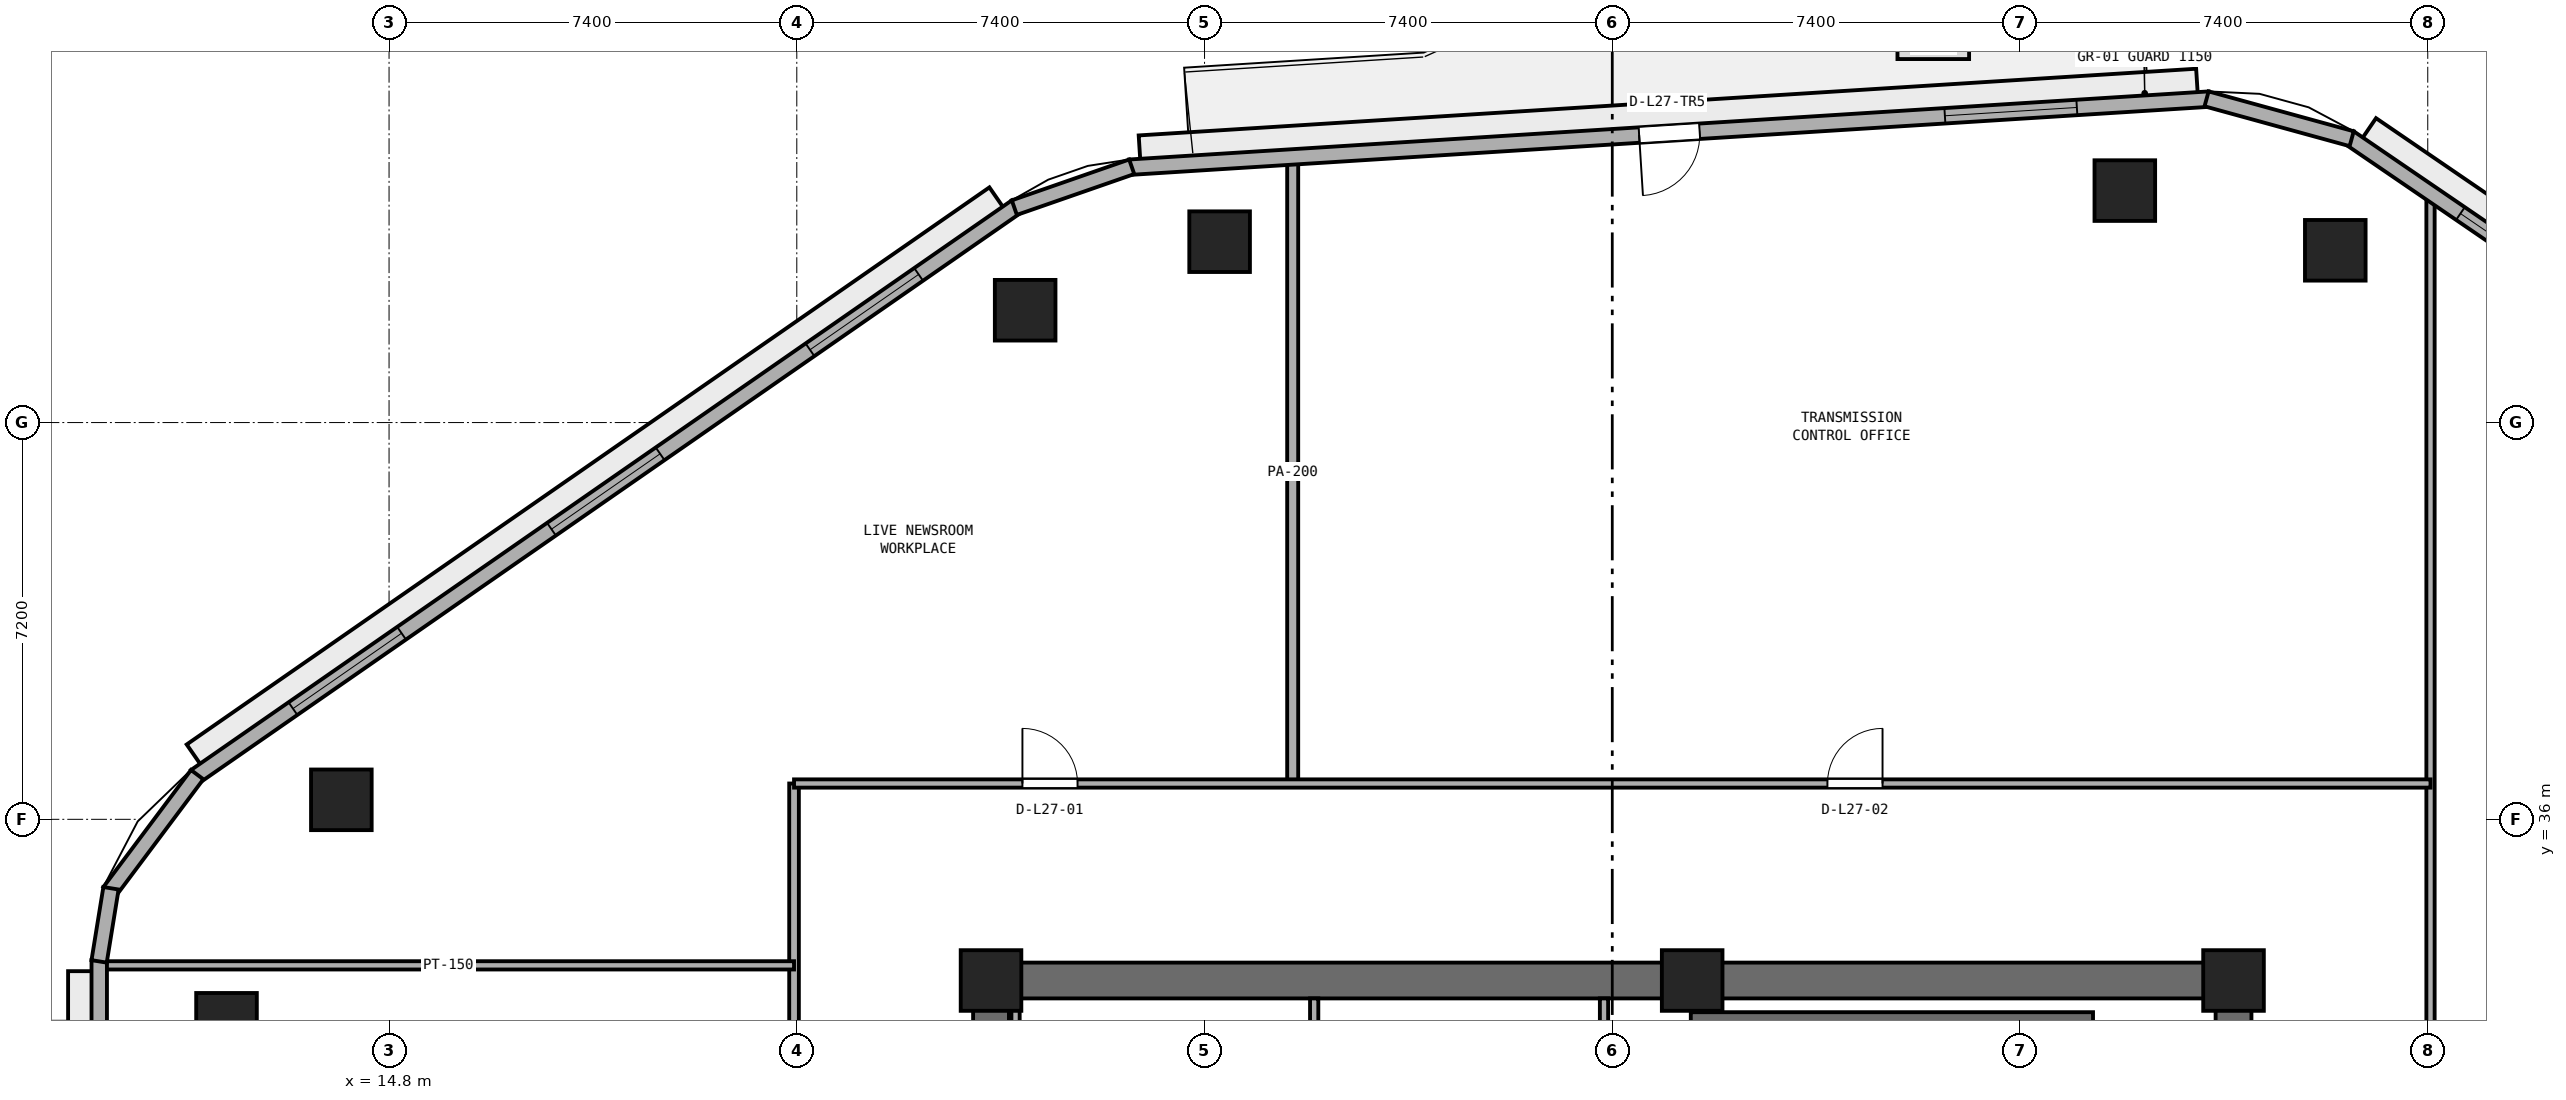
"""IFC4 building model, lengths in metres.
Left out: names, types, materials, properties, quantities, classifications, styles, units other than length and angle.
Written with IfcOpenShell. Run it as: python <this file> out.ifc"""

import sys

from ifc_helpers import new_model, si_unit, direction, frame, frame_2d, origin, origin_2d, place, context, subcontext, project, spatial, rectangle, extrude, element, fill, save


model = new_model("IFC4")
c1 = context("Model", 3, precision=1e-05, world=origin(), true_north=direction((0.0, 1.0)))
c2 = subcontext(c1, "Body", "Model", "MODEL_VIEW")
j1 = project(units=[si_unit("LENGTHUNIT", "METRE"), si_unit("PLANEANGLEUNIT", "RADIAN")], contexts=[c1])
p1 = place(None, origin())
s1 = spatial("IfcSite", under=j1, at=p1, CompositionType="ELEMENT")
p2 = place(p1, origin())
s2 = spatial("IfcBuilding", under=s1, at=p2, CompositionType="ELEMENT")
p3 = place(p2, frame((0.0, 0.0, 108.6)))
s3 = spatial("IfcBuildingStorey", under=s2, at=p3, CompositionType="ELEMENT", Elevation=108.6)
p4 = place(p3, frame((25.4, 33.075, 0.0), z_axis=(0.0, 0.0, 1.0), x_axis=(1.0, 0.0, 0.0)))
e1 = element("IfcWall", 1, at=p4, inside=s3, PredefinedType="SHEAR", context=c2, shape_type="SweptSolid", body=[
    extrude(rectangle(XDim=23.2, YDim=0.65, at=frame_2d((11.6, 0.0))), origin(), (0.0, 0.0, 1.0), 3.525),
])
p5 = place(p3, frame((25.725, 17.65, 0.0), z_axis=(0.0, 0.0, 1.0), x_axis=(0.0, 1.0, 0.0)))
e2 = element("IfcWall", 2, at=p5, inside=s3, PredefinedType="SHEAR", context=c2, shape_type="SweptSolid", body=[
    extrude(rectangle(XDim=15.1, YDim=0.65, at=frame_2d((7.55, 0.0))), origin(), (0.0, 0.0, 1.0), 3.525),
])
p6 = place(p5, frame((6.8, 0.0, 0.0)))
e3 = element("IfcOpeningElement", 3, at=p6, cuts=e2, PredefinedType="OPENING", context=c2, shape_type="SweptSolid", body=[
    extrude(rectangle(XDim=1.5, YDim=2.15, at=frame_2d((0.75, 1.075))), frame((0.0, 0.335, 0.0), z_axis=(0.0, -1.0, 0.0), x_axis=(1.0, 0.0, 0.0)), (0.0, 0.0, 1.0), 0.67),
])
p7 = place(p3, frame((48.275, 17.65, 0.0), z_axis=(0.0, 0.0, 1.0), x_axis=(0.0, 1.0, 0.0)))
e4 = element("IfcWall", 4, at=p7, inside=s3, PredefinedType="SHEAR", context=c2, shape_type="SweptSolid", body=[
    extrude(rectangle(XDim=15.1, YDim=0.65, at=frame_2d((7.55, 0.0))), origin(), (0.0, 0.0, 1.0), 3.525),
])
p8 = place(p7, frame((5.65, 0.0, 0.0)))
e5 = element("IfcOpeningElement", 5, at=p8, cuts=e4, PredefinedType="OPENING", context=c2, shape_type="SweptSolid", body=[
    extrude(rectangle(XDim=1.5, YDim=2.15, at=frame_2d((0.75, 1.075))), frame((0.0, 0.335, 0.0), z_axis=(0.0, -1.0, 0.0), x_axis=(1.0, 0.0, 0.0)), (0.0, 0.0, 1.0), 0.67),
])
for number, where, z_axis, x_axis in (
    (6, (48.275, 33.075, 0.0), (0.0, 0.0, 1.0), (1.0, 0.0, 0.0)),
    (7, (38.45, 33.075, 0.0), (0.0, 0.0, 1.0), (1.0, 0.0, 0.0)),
    (8, (25.725, 33.075, 0.0), (0.0, 0.0, 1.0), (1.0, 0.0, 0.0)),
):
    element("IfcColumn", number, at=place(p3, frame(where, z_axis=z_axis, x_axis=x_axis)), inside=s3, PredefinedType="PILASTER", context=c2, shape_type="SweptSolid", body=[
        extrude(rectangle(XDim=1.1, YDim=1.1, at=origin_2d()), origin(), (0.0, 0.0, 1.0), 3.8),
    ])
for number, where, z_axis, x_axis in (
    (9, (50.122, 46.326, 0.0), (0.0, 0.0, 1.0), (1.0, 0.0, 0.0)),
    (10, (46.302, 47.409, 0.0), (0.0, 0.0, 1.0), (1.0, 0.0, 0.0)),
    (11, (29.874, 46.482, 0.0), (0.0, 0.0, 1.0), (1.0, 0.0, 0.0)),
    (12, (26.344, 45.238, 0.0), (0.0, 0.0, 1.0), (1.0, 0.0, 0.0)),
    (13, (13.934, 36.354, 0.0), (0.0, 0.0, 1.0), (1.0, 0.0, 0.0)),
    (14, (11.85, 32.298, 0.0), (0.0, 0.0, 1.0), (1.0, 0.0, 0.0)),
):
    element("IfcColumn", number, at=place(p3, frame(where, z_axis=z_axis, x_axis=x_axis)), inside=s3, PredefinedType="COLUMN", context=c2, shape_type="SweptSolid", body=[
        extrude(rectangle(XDim=1.1, YDim=1.1, at=origin_2d()), origin(), (0.0, 0.0, 1.0), 3.8),
    ])
p9 = place(p3, frame((38.425, 32.375, 0.0), z_axis=(0.0, 0.0, 1.0), x_axis=(1.0, 0.0, 0.0)))
e15 = element("IfcWall", 15, at=p9, inside=s3, PredefinedType="SHEAR", context=c2, shape_type="SweptSolid", body=[
    extrude(rectangle(XDim=7.3, YDim=0.25, at=frame_2d((3.65, 0.0))), origin(), (0.0, 0.0, 1.0), 3.525),
])
for number, where, z_axis, x_axis in (
    (16, (26.17, 30.65, 0.0), (0.0, 0.0, 1.0), (0.0, 1.0, 0.0)),
    (17, (31.59, 30.65, 0.0), (0.0, 0.0, 1.0), (0.0, 1.0, 0.0)),
    (18, (36.85, 30.65, 0.0), (0.0, 0.0, 1.0), (0.0, 1.0, 0.0)),
):
    element("IfcWall", number, at=place(p3, frame(where, z_axis=z_axis, x_axis=x_axis)), inside=s3, PredefinedType="PARTITIONING", context=c2, shape_type="SweptSolid", body=[
        extrude(rectangle(XDim=2.1, YDim=0.15, at=frame_2d((1.05, 0.0))), origin(), (0.0, 0.0, 1.0), 3.525),
    ])
p10 = place(p3, frame((51.85, 13.75, 0.0), z_axis=(0.0, 0.0, 1.0), x_axis=(0.0, 1.0, 0.0)))
e19 = element("IfcWall", 19, at=p10, inside=s3, PredefinedType="PARTITIONING", context=c2, shape_type="SweptSolid", body=[
    extrude(rectangle(XDim=33.644, YDim=0.15, at=frame_2d((16.822, 0.0))), origin(), (0.0, 0.0, 1.0), 3.525),
])
p11 = place(p10, frame((5.425, 0.0, 0.0)))
e20 = element("IfcOpeningElement", 20, at=p11, cuts=e19, PredefinedType="OPENING", context=c2, shape_type="SweptSolid", body=[
    extrude(rectangle(XDim=0.9, YDim=2.1, at=frame_2d((0.45, 1.05))), frame((0.0, 0.085, 0.0), z_axis=(0.0, -1.0, 0.0), x_axis=(1.0, 0.0, 0.0)), (0.0, 0.0, 1.0), 0.17),
])
p12 = place(p10, frame((15.225, 0.0, 0.0)))
e21 = element("IfcOpeningElement", 21, at=p12, cuts=e19, PredefinedType="OPENING", context=c2, shape_type="SweptSolid", body=[
    extrude(rectangle(XDim=0.9, YDim=2.1, at=frame_2d((0.45, 1.05))), frame((0.0, 0.085, 0.0), z_axis=(0.0, -1.0, 0.0), x_axis=(1.0, 0.0, 0.0)), (0.0, 0.0, 1.0), 0.17),
])
p13 = place(p3, frame((31.2, 36.65, 0.0), z_axis=(0.0, 0.0, 1.0), x_axis=(0.0, 1.0, 0.0)))
e22 = element("IfcWall", 22, at=p13, inside=s3, PredefinedType="PARTITIONING", context=c2, shape_type="SweptSolid", body=[
    extrude(rectangle(XDim=11.306, YDim=0.2, at=frame_2d((5.653, 0.0))), origin(), (0.0, 0.0, 1.0), 3.525),
])
p14 = place(p3, frame((22.15, 5.798, 0.0), z_axis=(0.0, 0.0, 1.0), x_axis=(0.0, 1.0, 0.0)))
e23 = element("IfcWall", 23, at=p14, inside=s3, PredefinedType="PARTITIONING", context=c2, shape_type="SweptSolid", body=[
    extrude(rectangle(XDim=30.852, YDim=0.175, at=frame_2d((15.426, 0.0))), origin(), (0.0, 0.0, 1.0), 3.525),
])
p15 = place(p14, frame((17.302, 0.0, 0.0)))
e24 = element("IfcOpeningElement", 24, at=p15, cuts=e23, PredefinedType="OPENING", context=c2, shape_type="SweptSolid", body=[
    extrude(rectangle(XDim=0.9, YDim=2.1, at=frame_2d((0.45, 1.05))), frame((0.0, 0.097, 0.0), z_axis=(0.0, -1.0, 0.0), x_axis=(1.0, 0.0, 0.0)), (0.0, 0.0, 1.0), 0.195),
])
p16 = place(p3, frame((9.605, 33.35, 0.0), z_axis=(0.0, 0.0, 1.0), x_axis=(1.0, 0.0, 0.0)))
e25 = element("IfcWall", 25, at=p16, inside=s3, PredefinedType="PARTITIONING", context=c2, shape_type="SweptSolid", body=[
    extrude(rectangle(XDim=12.545, YDim=0.15, at=frame_2d((6.272, 0.0))), origin(), (0.0, 0.0, 1.0), 3.525),
])
p17 = place(p3, frame((22.15, 36.65, 0.0), z_axis=(0.0, 0.0, 1.0), x_axis=(1.0, 0.0, 0.0)))
e26 = element("IfcWall", 26, at=p17, inside=s3, PredefinedType="PARTITIONING", context=c2, shape_type="SweptSolid", body=[
    extrude(rectangle(XDim=29.7, YDim=0.15, at=frame_2d((14.85, 0.0))), origin(), (0.0, 0.0, 1.0), 3.525),
])
p18 = place(p17, frame((4.145, 0.0, 0.0)))
e27 = element("IfcOpeningElement", 27, at=p18, cuts=e26, PredefinedType="OPENING", context=c2, shape_type="SweptSolid", body=[
    extrude(rectangle(XDim=1.0, YDim=2.12, at=frame_2d((0.5, 1.06))), frame((0.0, 0.085, 0.0), z_axis=(0.0, -1.0, 0.0), x_axis=(1.0, 0.0, 0.0)), (0.0, 0.0, 1.0), 0.17),
])
p19 = place(p17, frame((18.755, 0.0, 0.0)))
e28 = element("IfcOpeningElement", 28, at=p19, cuts=e26, PredefinedType="OPENING", context=c2, shape_type="SweptSolid", body=[
    extrude(rectangle(XDim=1.0, YDim=2.12, at=frame_2d((0.5, 1.06))), frame((0.0, 0.085, 0.0), z_axis=(0.0, -1.0, 0.0), x_axis=(1.0, 0.0, 0.0)), (0.0, 0.0, 1.0), 0.17),
])
p20 = place(p3, frame((64.29, 38.867, 0.0), z_axis=(0.0, 0.0, 1.0), x_axis=(-0.825755550159, 0.564028165416, 0.0)))
e29 = element("IfcWall", 29, at=p20, inside=s3, PredefinedType="STANDARD", context=c2, shape_type="SweptSolid", body=[
    extrude(rectangle(XDim=16.848, YDim=0.28, at=frame_2d((8.424, 0.0))), origin(), (0.0, 0.0, 1.0), 3.525),
])
p21 = place(p20, frame((1.941, 0.0, 0.9)))
e30 = element("IfcOpeningElement", 30, at=p21, cuts=e29, PredefinedType="OPENING", context=c2, shape_type="SweptSolid", body=[
    extrude(rectangle(XDim=2.4, YDim=1.75, at=frame_2d((1.2, 0.875))), frame((0.0, 0.15, 0.0), z_axis=(0.0, -1.0, 0.0), x_axis=(1.0, 0.0, 0.0)), (0.0, 0.0, 1.0), 0.3),
])
p22 = place(p20, frame((7.224, 0.0, 0.9)))
e31 = element("IfcOpeningElement", 31, at=p22, cuts=e29, PredefinedType="OPENING", context=c2, shape_type="SweptSolid", body=[
    extrude(rectangle(XDim=2.4, YDim=1.75, at=frame_2d((1.2, 0.875))), frame((0.0, 0.15, 0.0), z_axis=(0.0, -1.0, 0.0), x_axis=(1.0, 0.0, 0.0)), (0.0, 0.0, 1.0), 0.3),
])
p23 = place(p20, frame((12.007, 0.0, 0.9)))
e32 = element("IfcOpeningElement", 32, at=p23, cuts=e29, PredefinedType="OPENING", context=c2, shape_type="SweptSolid", body=[
    extrude(rectangle(XDim=2.4, YDim=1.75, at=frame_2d((1.2, 0.875))), frame((0.0, 0.15, 0.0), z_axis=(0.0, -1.0, 0.0), x_axis=(1.0, 0.0, 0.0)), (0.0, 0.0, 1.0), 0.3),
])
p24 = place(p3, frame((47.832, 49.069, 0.0), z_axis=(0.0, 0.0, 1.0), x_axis=(-0.998017725054, -0.062933460723, 0.0)))
e33 = element("IfcWall", 33, at=p24, inside=s3, PredefinedType="STANDARD", context=c2, shape_type="SweptSolid", body=[
    extrude(rectangle(XDim=19.629, YDim=0.28, at=frame_2d((9.815, 0.0))), origin(), (0.0, 0.0, 1.0), 3.525),
])
p25 = place(p24, frame((9.265, 0.0, 0.0)))
e34 = element("IfcOpeningElement", 34, at=p25, cuts=e33, PredefinedType="OPENING", context=c2, shape_type="SweptSolid", body=[
    extrude(rectangle(XDim=1.1, YDim=2.2, at=frame_2d((0.55, 1.1))), frame((0.0, 0.15, 0.0), z_axis=(0.0, -1.0, 0.0), x_axis=(1.0, 0.0, 0.0)), (0.0, 0.0, 1.0), 0.3),
])
p26 = place(p24, frame((2.405, 0.0, 0.9)))
e35 = element("IfcOpeningElement", 35, at=p26, cuts=e33, PredefinedType="OPENING", context=c2, shape_type="SweptSolid", body=[
    extrude(rectangle(XDim=2.4, YDim=1.75, at=frame_2d((1.2, 0.875))), frame((0.0, 0.15, 0.0), z_axis=(0.0, -1.0, 0.0), x_axis=(1.0, 0.0, 0.0)), (0.0, 0.0, 1.0), 0.3),
])
p27 = place(p3, frame((26.182, 47.118, 0.0), z_axis=(0.0, 0.0, 1.0), x_axis=(-0.821547956627, -0.570139417127, 0.0)))
e36 = element("IfcWall", 36, at=p27, inside=s3, PredefinedType="STANDARD", context=c2, shape_type="SweptSolid", body=[
    extrude(rectangle(XDim=18.132, YDim=0.28, at=frame_2d((9.066, 0.0))), origin(), (0.0, 0.0, 1.0), 3.525),
])
p28 = place(p27, frame((2.156, 0.0, 0.9)))
e37 = element("IfcOpeningElement", 37, at=p28, cuts=e36, PredefinedType="OPENING", context=c2, shape_type="SweptSolid", body=[
    extrude(rectangle(XDim=2.4, YDim=1.75, at=frame_2d((1.2, 0.875))), frame((0.0, 0.15, 0.0), z_axis=(0.0, -1.0, 0.0), x_axis=(1.0, 0.0, 0.0)), (0.0, 0.0, 1.0), 0.3),
])
p29 = place(p27, frame((7.866, 0.0, 0.9)))
e38 = element("IfcOpeningElement", 38, at=p29, cuts=e36, PredefinedType="OPENING", context=c2, shape_type="SweptSolid", body=[
    extrude(rectangle(XDim=2.4, YDim=1.75, at=frame_2d((1.2, 0.875))), frame((0.0, 0.15, 0.0), z_axis=(0.0, -1.0, 0.0), x_axis=(1.0, 0.0, 0.0)), (0.0, 0.0, 1.0), 0.3),
])
p30 = place(p27, frame((13.577, 0.0, 0.9)))
e39 = element("IfcOpeningElement", 39, at=p30, cuts=e36, PredefinedType="OPENING", context=c2, shape_type="SweptSolid", body=[
    extrude(rectangle(XDim=2.4, YDim=1.75, at=frame_2d((1.2, 0.875))), frame((0.0, 0.15, 0.0), z_axis=(0.0, -1.0, 0.0), x_axis=(1.0, 0.0, 0.0)), (0.0, 0.0, 1.0), 0.3),
])
p31 = place(p3, frame((9.54, 33.444, 0.0), z_axis=(0.0, 0.0, 1.0), x_axis=(0.0, -1.0, 0.0)))
e40 = element("IfcWall", 40, at=p31, inside=s3, PredefinedType="STANDARD", context=c2, shape_type="SweptSolid", body=[
    extrude(rectangle(XDim=17.301, YDim=0.28, at=frame_2d((8.65, 0.0))), origin(), (0.0, 0.0, 1.0), 3.525),
])
p32 = place(p31, frame((8.1, 0.0, 0.0)))
e41 = element("IfcOpeningElement", 41, at=p32, cuts=e40, PredefinedType="OPENING", context=c2, shape_type="SweptSolid", body=[
    extrude(rectangle(XDim=1.1, YDim=2.2, at=frame_2d((0.55, 1.1))), frame((0.0, 0.15, 0.0), z_axis=(0.0, -1.0, 0.0), x_axis=(1.0, 0.0, 0.0)), (0.0, 0.0, 1.0), 0.3),
])
p33 = place(p31, frame((2.017, 0.0, 0.9)))
e42 = element("IfcOpeningElement", 42, at=p33, cuts=e40, PredefinedType="OPENING", context=c2, shape_type="SweptSolid", body=[
    extrude(rectangle(XDim=2.4, YDim=1.75, at=frame_2d((1.2, 0.875))), frame((0.0, 0.15, 0.0), z_axis=(0.0, -1.0, 0.0), x_axis=(1.0, 0.0, 0.0)), (0.0, 0.0, 1.0), 0.3),
])
p34 = place(p31, frame((12.884, 0.0, 0.9)))
e43 = element("IfcOpeningElement", 43, at=p34, cuts=e40, PredefinedType="OPENING", context=c2, shape_type="SweptSolid", body=[
    extrude(rectangle(XDim=2.4, YDim=1.75, at=frame_2d((1.2, 0.875))), frame((0.0, 0.15, 0.0), z_axis=(0.0, -1.0, 0.0), x_axis=(1.0, 0.0, 0.0)), (0.0, 0.0, 1.0), 0.3),
])
p35 = place(p3, frame((50.419, 48.351, 0.0), z_axis=(0.0, 0.0, 1.0), x_axis=(-0.964254516967, 0.264977784933, 0.0)))
e44 = element("IfcWall", 44, at=p35, inside=s3, PredefinedType="STANDARD", context=c2, shape_type="SweptSolid", body=[
    extrude(rectangle(XDim=2.731, YDim=0.28, at=frame_2d((1.365, 0.0))), origin(), (0.0, 0.0, 1.0), 3.525),
])
p36 = place(p3, frame((28.278, 47.842, 0.0), z_axis=(0.0, 0.0, 1.0), x_axis=(-0.9444559001, -0.328638179106, 0.0)))
e45 = element("IfcWall", 45, at=p36, inside=s3, PredefinedType="STANDARD", context=c2, shape_type="SweptSolid", body=[
    extrude(rectangle(XDim=2.255, YDim=0.28, at=frame_2d((1.128, 0.0))), origin(), (0.0, 0.0, 1.0), 3.525),
])
p37 = place(p3, frame((11.318, 36.811, 0.0), z_axis=(0.0, 0.0, 1.0), x_axis=(-0.599455152629, -0.800408345775, 0.0)))
e46 = element("IfcWall", 46, at=p37, inside=s3, PredefinedType="STANDARD", context=c2, shape_type="SweptSolid", body=[
    extrude(rectangle(XDim=2.653, YDim=0.28, at=frame_2d((1.327, 0.0))), origin(), (0.0, 0.0, 1.0), 3.525),
])
p38 = place(p3, frame((9.753, 34.749, 0.0), z_axis=(0.0, 0.0, 1.0), x_axis=(-0.160037671962, -0.987110907423, 0.0)))
e47 = element("IfcWall", 47, at=p38, inside=s3, PredefinedType="STANDARD", context=c2, shape_type="SweptSolid", body=[
    extrude(rectangle(XDim=1.344, YDim=0.28, at=frame_2d((0.672, 0.0))), origin(), (0.0, 0.0, 1.0), 3.525),
])
p39 = place(p18, origin())
e48 = element("IfcDoor", 48, at=p39, inside=s3, OperationType="SINGLE_SWING_LEFT", PredefinedType="DOOR", context=c2, shape_type="SweptSolid", body=[
    extrude(rectangle(XDim=1.0, YDim=2.12, at=frame_2d((0.5, 1.06))), frame((0.0, 0.025, 0.0), z_axis=(0.0, -1.0, 0.0), x_axis=(1.0, 0.0, 0.0)), (0.0, 0.0, 1.0), 0.05),
])
fill(e27, e48)
p40 = place(p19, origin())
e49 = element("IfcDoor", 49, at=p40, inside=s3, OperationType="SINGLE_SWING_RIGHT", PredefinedType="DOOR", context=c2, shape_type="SweptSolid", body=[
    extrude(rectangle(XDim=1.0, YDim=2.12, at=frame_2d((0.5, 1.06))), frame((0.0, 0.025, 0.0), z_axis=(0.0, -1.0, 0.0), x_axis=(1.0, 0.0, 0.0)), (0.0, 0.0, 1.0), 0.05),
])
fill(e28, e49)
p41 = place(p23, origin())
e50 = element("IfcWindow", 50, at=p41, inside=s3, PartitioningType="SINGLE_PANEL", PredefinedType="WINDOW", context=c2, shape_type="SweptSolid", body=[
    extrude(rectangle(XDim=2.4, YDim=1.75, at=frame_2d((1.2, 0.875))), frame((0.0, 0.03, 0.0), z_axis=(0.0, -1.0, 0.0), x_axis=(1.0, 0.0, 0.0)), (0.0, 0.0, 1.0), 0.06),
])
fill(e32, e50)
p42 = place(p25, origin())
e51 = element("IfcDoor", 51, at=p42, inside=s3, OperationType="SINGLE_SWING_RIGHT", PredefinedType="DOOR", context=c2, shape_type="SweptSolid", body=[
    extrude(rectangle(XDim=1.1, YDim=2.2, at=frame_2d((0.55, 1.1))), frame((0.0, 0.025, 0.0), z_axis=(0.0, -1.0, 0.0), x_axis=(1.0, 0.0, 0.0)), (0.0, 0.0, 1.0), 0.05),
])
fill(e34, e51)
p43 = place(p26, origin())
e52 = element("IfcWindow", 52, at=p43, inside=s3, PartitioningType="SINGLE_PANEL", PredefinedType="WINDOW", context=c2, shape_type="SweptSolid", body=[
    extrude(rectangle(XDim=2.4, YDim=1.75, at=frame_2d((1.2, 0.875))), frame((0.0, 0.03, 0.0), z_axis=(0.0, -1.0, 0.0), x_axis=(1.0, 0.0, 0.0)), (0.0, 0.0, 1.0), 0.06),
])
fill(e35, e52)
p44 = place(p28, origin())
e53 = element("IfcWindow", 53, at=p44, inside=s3, PartitioningType="SINGLE_PANEL", PredefinedType="WINDOW", context=c2, shape_type="SweptSolid", body=[
    extrude(rectangle(XDim=2.4, YDim=1.75, at=frame_2d((1.2, 0.875))), frame((0.0, 0.03, 0.0), z_axis=(0.0, -1.0, 0.0), x_axis=(1.0, 0.0, 0.0)), (0.0, 0.0, 1.0), 0.06),
])
fill(e37, e53)
p45 = place(p29, origin())
e54 = element("IfcWindow", 54, at=p45, inside=s3, PartitioningType="SINGLE_PANEL", PredefinedType="WINDOW", context=c2, shape_type="SweptSolid", body=[
    extrude(rectangle(XDim=2.4, YDim=1.75, at=frame_2d((1.2, 0.875))), frame((0.0, 0.03, 0.0), z_axis=(0.0, -1.0, 0.0), x_axis=(1.0, 0.0, 0.0)), (0.0, 0.0, 1.0), 0.06),
])
fill(e38, e54)
p46 = place(p30, origin())
e55 = element("IfcWindow", 55, at=p46, inside=s3, PartitioningType="SINGLE_PANEL", PredefinedType="WINDOW", context=c2, shape_type="SweptSolid", body=[
    extrude(rectangle(XDim=2.4, YDim=1.75, at=frame_2d((1.2, 0.875))), frame((0.0, 0.03, 0.0), z_axis=(0.0, -1.0, 0.0), x_axis=(1.0, 0.0, 0.0)), (0.0, 0.0, 1.0), 0.06),
])
fill(e39, e55)
save(model, sys.argv[1])
